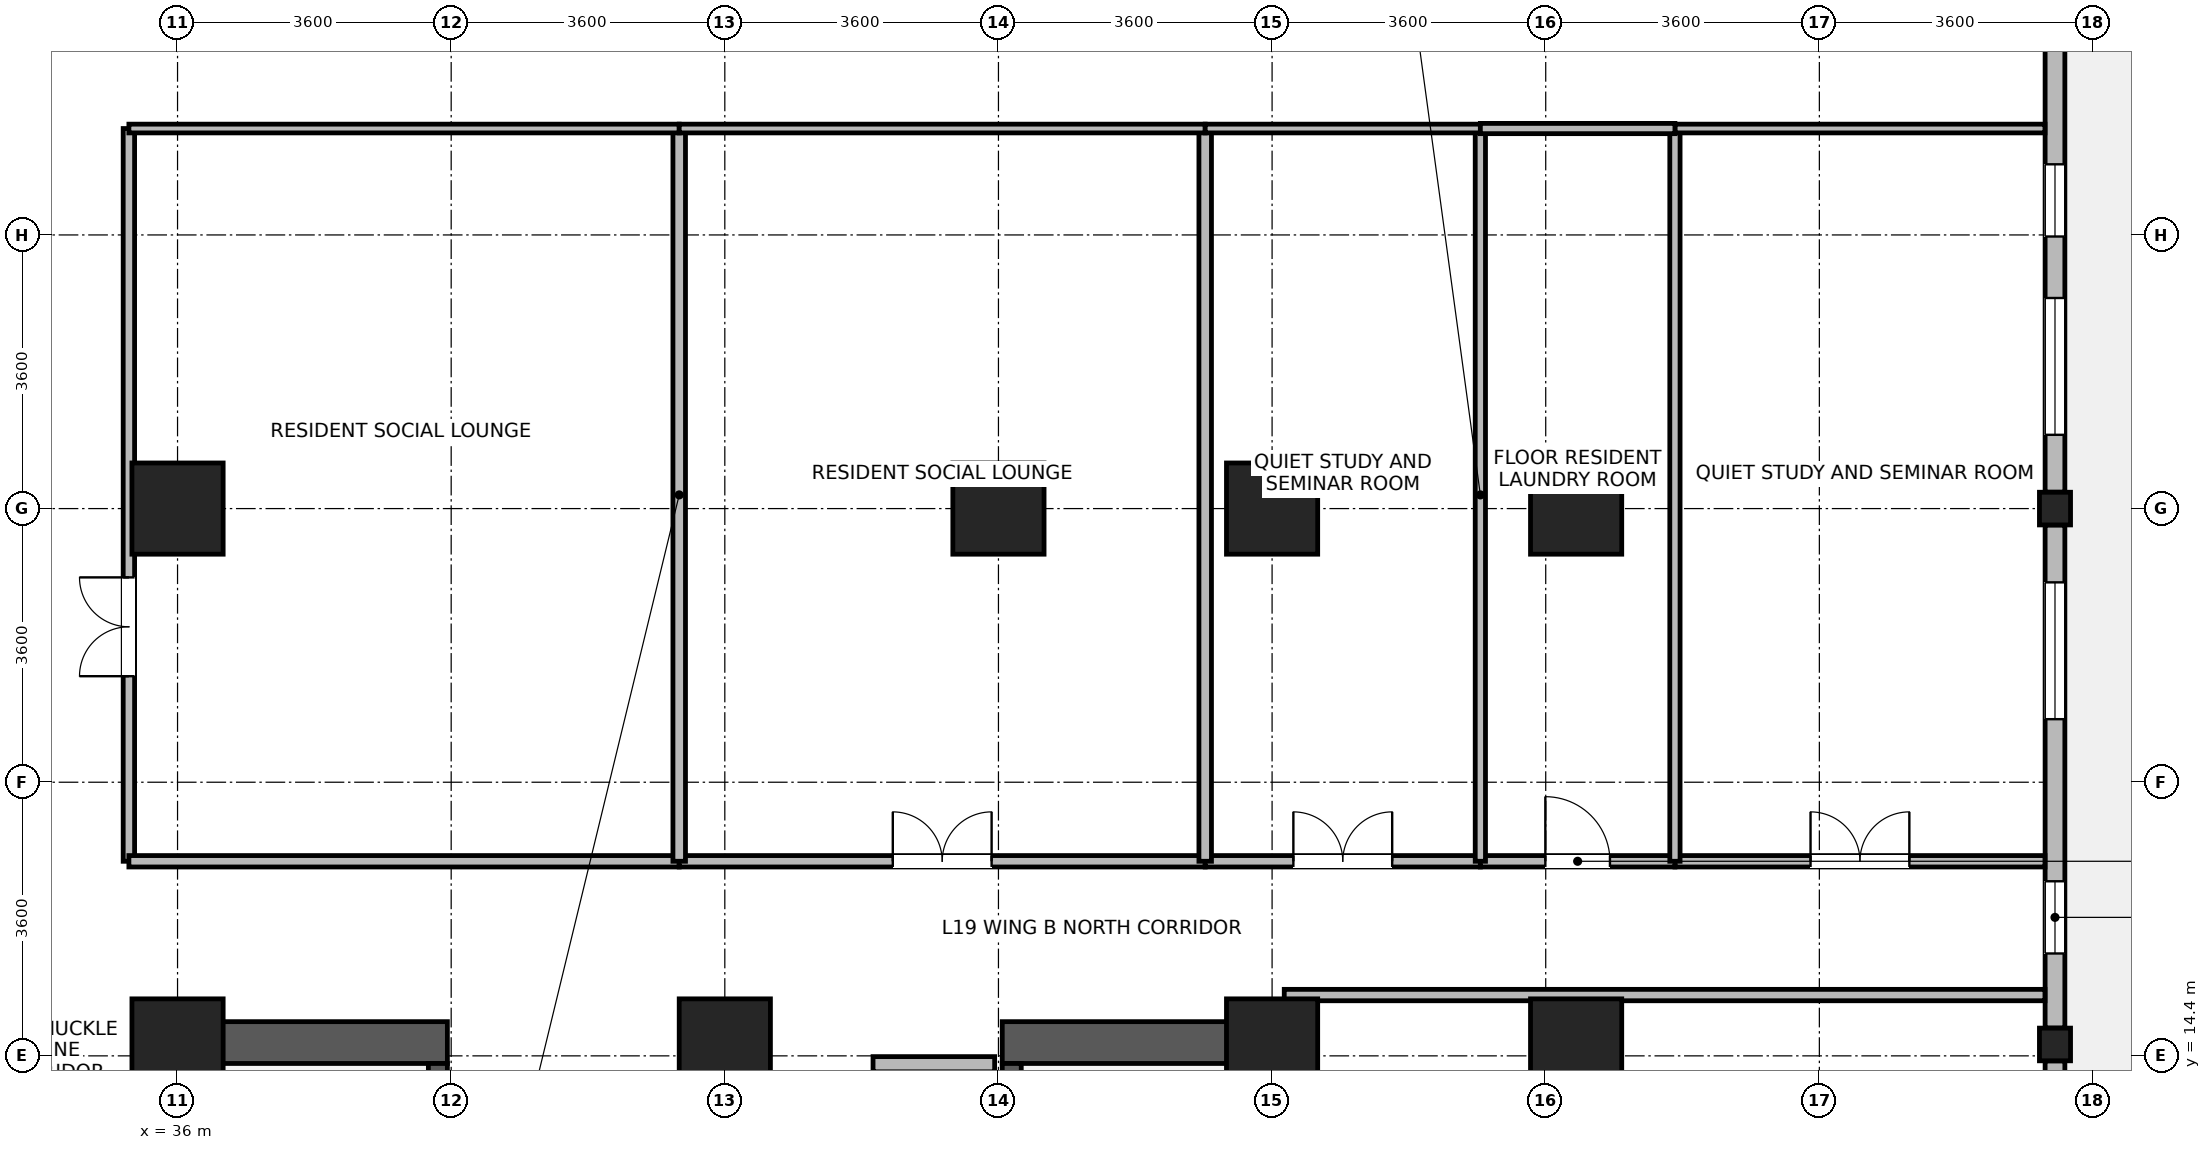
"""IFC4 building model, lengths in metres.
Left out: names, types, materials, properties, quantities, classifications, styles, units other than length and angle.
Written with IfcOpenShell. Run it as: python <this file> out.ifc"""

import sys

from ifc_helpers import new_model, si_unit, direction, frame, frame_2d, origin, origin_2d, place, context, subcontext, project, spatial, rectangle, i_section, extrude, source, transform, mapped, element, fill, save


model = new_model("IFC4")
c1 = context("Model", 3, precision=1e-05, world=origin(), true_north=direction((0.0, 1.0)))
c2 = subcontext(c1, "Body", "Model", "MODEL_VIEW")
j1 = project(units=[si_unit("LENGTHUNIT", "METRE"), si_unit("PLANEANGLEUNIT", "RADIAN")], contexts=[c1])
p1 = place(None, origin())
s1 = spatial("IfcSite", under=j1, at=p1, CompositionType="ELEMENT")
p2 = place(p1, origin())
s2 = spatial("IfcBuilding", under=s1, at=p2, CompositionType="ELEMENT")
p3 = place(p2, frame((0.0, 0.0, 78.6)))
s3 = spatial("IfcBuildingStorey", under=s2, at=p3, CompositionType="ELEMENT", Elevation=78.6)
for number, where, z_axis, x_axis in (
    (1, (36.075, 6.75, 0.0), (0.0, 0.0, 1.0), (0.0, 1.0, 0.0)),
    (2, (50.325, 6.75, 0.0), (0.0, 0.0, 1.0), (0.0, 1.0, 0.0)),
):
    element("IfcWall", number, at=place(p3, frame(where, z_axis=z_axis, x_axis=x_axis)), inside=s3, PredefinedType="SHEAR", context=c2, shape_type="SweptSolid", body=[
        extrude(rectangle(XDim=8.1, YDim=0.55, at=frame_2d((4.05, 0.0))), origin(), (0.0, 0.0, 1.0), 3.45),
    ])
for number, where, z_axis, x_axis in (
    (3, (36.35, 14.575, 0.0), (0.0, 0.0, 1.0), (1.0, 0.0, 0.0)),
    (4, (46.85, 14.575, 0.0), (0.0, 0.0, 1.0), (1.0, 0.0, 0.0)),
):
    element("IfcWall", number, at=place(p3, frame(where, z_axis=z_axis, x_axis=x_axis)), inside=s3, PredefinedType="SHEAR", context=c2, shape_type="SweptSolid", body=[
        extrude(rectangle(XDim=3.2, YDim=0.55, at=frame_2d((1.6, 0.0))), origin(), (0.0, 0.0, 1.0), 3.45),
    ])
p4 = place(p3, frame((39.425, 7.3, 0.0), z_axis=(0.0, 0.0, 1.0), x_axis=(0.0, 1.0, 0.0)))
e5 = element("IfcWall", 5, at=p4, inside=s3, PredefinedType="SHEAR", context=c2, shape_type="SweptSolid", body=[
    extrude(rectangle(XDim=7.0, YDim=0.25, at=frame_2d((3.5, 0.0))), origin(), (0.0, 0.0, 1.0), 3.45),
])
p5 = place(p4, frame((0.15, 0.0, 0.0)))
e6 = element("IfcOpeningElement", 6, at=p5, cuts=e5, PredefinedType="OPENING", context=c2, shape_type="SweptSolid", body=[
    extrude(rectangle(XDim=1.1, YDim=2.08, at=frame_2d((0.55, 1.04))), frame((0.0, 0.135, 0.0), z_axis=(0.0, -1.0, 0.0), x_axis=(1.0, 0.0, 0.0)), (0.0, 0.0, 1.0), 0.27),
])
p6 = place(p3, frame((46.975, 7.3, 0.0), z_axis=(0.0, 0.0, 1.0), x_axis=(0.0, 1.0, 0.0)))
e7 = element("IfcWall", 7, at=p6, inside=s3, PredefinedType="SHEAR", context=c2, shape_type="SweptSolid", body=[
    extrude(rectangle(XDim=7.0, YDim=0.25, at=frame_2d((3.5, 0.0))), origin(), (0.0, 0.0, 1.0), 3.45),
])
p7 = place(p6, frame((0.15, 0.0, 0.0)))
e8 = element("IfcOpeningElement", 8, at=p7, cuts=e7, PredefinedType="OPENING", context=c2, shape_type="SweptSolid", body=[
    extrude(rectangle(XDim=1.1, YDim=2.08, at=frame_2d((0.55, 1.04))), frame((0.0, 0.135, 0.0), z_axis=(0.0, -1.0, 0.0), x_axis=(1.0, 0.0, 0.0)), (0.0, 0.0, 1.0), 0.27),
])
m1 = source(origin(), c2, "Body", "SweptSolid", [
    extrude(rectangle(XDim=1.2, YDim=1.2, at=origin_2d()), origin(), (0.0, 0.0, 1.0), 3.7),
])
for number, where, z_axis, x_axis in (
    (9, (36.0, 21.6, 0.0), (0.0, 0.0, 1.0), (1.0, 0.0, 0.0)),
    (10, (46.8, 21.6, 0.0), (0.0, 0.0, 1.0), (1.0, 0.0, 0.0)),
    (11, (36.0, 14.55, 0.0), (0.0, 0.0, 1.0), (1.0, 0.0, 0.0)),
    (12, (43.2, 14.55, 0.0), (0.0, 0.0, 1.0), (1.0, 0.0, 0.0)),
    (13, (50.4, 14.55, 0.0), (0.0, 0.0, 1.0), (1.0, 0.0, 0.0)),
    (14, (50.4, 21.6, 0.0), (0.0, 0.0, 1.0), (1.0, 0.0, 0.0)),
    (15, (54.4, 14.55, 0.0), (0.0, 0.0, 1.0), (1.0, 0.0, 0.0)),
    (16, (54.4, 21.6, 0.0), (0.0, 0.0, 1.0), (1.0, 0.0, 0.0)),
):
    element("IfcColumn", number, at=place(p3, frame(where, z_axis=z_axis, x_axis=x_axis)), inside=s3, PredefinedType="COLUMN", context=c2, shape_type="MappedRepresentation", body=[
        mapped(m1, transform((0.0, 0.0, 0.0), x_axis=(1.0, 0.0, 0.0), y_axis=(0.0, 1.0, 0.0), z_axis=(0.0, 0.0, 1.0), scale=1.0)),
    ])
m2 = source(origin(), c2, "Body", "SweptSolid", [
    extrude(i_section(OverallWidth=0.409, OverallDepth=0.43, WebThickness=0.024, FlangeThickness=0.033, FilletRadius=0.015, at=origin_2d()), origin(), (0.0, 0.0, 1.0), 3.7),
])
for number, where, z_axis, x_axis in (
    (17, (60.7, 14.55, 0.0), (0.0, 0.0, 1.0), (1.0, 0.0, 0.0)),
    (18, (60.7, 21.6, 0.0), (0.0, 0.0, 1.0), (1.0, 0.0, 0.0)),
):
    element("IfcColumn", number, at=place(p3, frame(where, z_axis=z_axis, x_axis=x_axis)), inside=s3, PredefinedType="COLUMN", context=c2, shape_type="MappedRepresentation", body=[
        mapped(m2, transform((0.0, 0.0, 0.0), x_axis=(1.0, 0.0, 0.0), y_axis=(0.0, 1.0, 0.0), z_axis=(0.0, 0.0, 1.0), scale=1.0)),
    ])
p8 = place(p3, frame((60.7, 14.334, 0.0), z_axis=(0.0, 0.0, 1.0), x_axis=(0.0, -1.0, 0.0)))
e19 = element("IfcWall", 19, at=p8, inside=s3, PredefinedType="STANDARD", context=c2, shape_type="SweptSolid", body=[
    extrude(rectangle(XDim=7.068, YDim=0.26, at=frame_2d((3.534, 0.0))), origin(), (0.0, 0.0, 1.0), 2.93),
])
p9 = place(p8, frame((0.867, 0.0, 0.85)))
e20 = element("IfcOpeningElement", 20, at=p9, cuts=e19, PredefinedType="OPENING", context=c2, shape_type="SweptSolid", body=[
    extrude(rectangle(XDim=1.8, YDim=1.85, at=frame_2d((0.9, 0.925))), frame((0.0, 0.14, 0.0), z_axis=(0.0, -1.0, 0.0), x_axis=(1.0, 0.0, 0.0)), (0.0, 0.0, 1.0), 0.28),
])
p10 = place(p8, frame((4.401, 0.0, 0.85)))
e21 = element("IfcOpeningElement", 21, at=p10, cuts=e19, PredefinedType="OPENING", context=c2, shape_type="SweptSolid", body=[
    extrude(rectangle(XDim=1.8, YDim=1.85, at=frame_2d((0.9, 0.925))), frame((0.0, 0.14, 0.0), z_axis=(0.0, -1.0, 0.0), x_axis=(1.0, 0.0, 0.0)), (0.0, 0.0, 1.0), 0.28),
])
p11 = place(p3, frame((60.7, 21.384, 0.0), z_axis=(0.0, 0.0, 1.0), x_axis=(0.0, -1.0, 0.0)))
e22 = element("IfcWall", 22, at=p11, inside=s3, PredefinedType="STANDARD", context=c2, shape_type="SweptSolid", body=[
    extrude(rectangle(XDim=6.618, YDim=0.26, at=frame_2d((3.309, 0.0))), origin(), (0.0, 0.0, 1.0), 2.93),
])
p12 = place(p11, frame((0.754, 0.0, 0.85)))
e23 = element("IfcOpeningElement", 23, at=p12, cuts=e22, PredefinedType="OPENING", context=c2, shape_type="SweptSolid", body=[
    extrude(rectangle(XDim=1.8, YDim=1.85, at=frame_2d((0.9, 0.925))), frame((0.0, 0.14, 0.0), z_axis=(0.0, -1.0, 0.0), x_axis=(1.0, 0.0, 0.0)), (0.0, 0.0, 1.0), 0.28),
])
p13 = place(p11, frame((4.687, 0.0, 0.85)))
e24 = element("IfcOpeningElement", 24, at=p13, cuts=e22, PredefinedType="OPENING", context=c2, shape_type="SweptSolid", body=[
    extrude(rectangle(XDim=0.95, YDim=1.75, at=frame_2d((0.475, 0.875))), frame((0.0, 0.14, 0.0), z_axis=(0.0, -1.0, 0.0), x_axis=(1.0, 0.0, 0.0)), (0.0, 0.0, 1.0), 0.28),
])
p14 = place(p3, frame((60.7, 28.434, 0.0), z_axis=(0.0, 0.0, 1.0), x_axis=(0.0, -1.0, 0.0)))
e25 = element("IfcWall", 25, at=p14, inside=s3, PredefinedType="STANDARD", context=c2, shape_type="SweptSolid", body=[
    extrude(rectangle(XDim=6.618, YDim=0.26, at=frame_2d((3.309, 0.0))), origin(), (0.0, 0.0, 1.0), 2.93),
])
p15 = place(p14, frame((4.063, 0.0, 0.85)))
e26 = element("IfcOpeningElement", 26, at=p15, cuts=e25, PredefinedType="OPENING", context=c2, shape_type="SweptSolid", body=[
    extrude(rectangle(XDim=1.8, YDim=1.85, at=frame_2d((0.9, 0.925))), frame((0.0, 0.14, 0.0), z_axis=(0.0, -1.0, 0.0), x_axis=(1.0, 0.0, 0.0)), (0.0, 0.0, 1.0), 0.28),
])
p16 = place(p14, frame((2.305, 0.0, 0.85)))
e27 = element("IfcOpeningElement", 27, at=p16, cuts=e25, PredefinedType="OPENING", context=c2, shape_type="SweptSolid", body=[
    extrude(rectangle(XDim=0.95, YDim=1.75, at=frame_2d((0.475, 0.875))), frame((0.0, 0.14, 0.0), z_axis=(0.0, -1.0, 0.0), x_axis=(1.0, 0.0, 0.0)), (0.0, 0.0, 1.0), 0.28),
])
p17 = place(p3, frame((45.15, 14.29, 0.0), z_axis=(0.0, 0.0, 1.0), x_axis=(1.0, 0.0, 0.0)))
e28 = element("IfcWall", 28, at=p17, inside=s3, PredefinedType="PARTITIONING", context=c2, shape_type="SweptSolid", body=[
    extrude(rectangle(XDim=1.6, YDim=0.2, at=frame_2d((0.8, 0.0))), origin(), (0.0, 0.0, 1.0), 2.23),
])
p18 = place(p3, frame((50.56, 15.2, 0.0), z_axis=(0.0, 0.0, 1.0), x_axis=(1.0, 0.0, 0.0)))
e29 = element("IfcWall", 29, at=p18, inside=s3, PredefinedType="PARTITIONING", context=c2, shape_type="SweptSolid", body=[
    extrude(rectangle(XDim=10.008, YDim=0.15, at=frame_2d((5.004, 0.0))), origin(), (0.0, 0.0, 1.0), 3.43),
])
p19 = place(p3, frame((35.36, 16.96, 0.0), z_axis=(0.0, 0.0, 1.0), x_axis=(0.0, 1.0, 0.0)))
e30 = element("IfcWall", 30, at=p19, inside=s3, PredefinedType="PARTITIONING", context=c2, shape_type="SweptSolid", body=[
    extrude(rectangle(XDim=9.64, YDim=0.15, at=frame_2d((4.82, 0.0))), origin(), (0.0, 0.0, 1.0), 3.43),
])
p20 = place(p19, frame((2.435, 0.0, 0.0)))
e31 = element("IfcOpeningElement", 31, at=p20, cuts=e30, PredefinedType="OPENING", context=c2, shape_type="SweptSolid", body=[
    extrude(rectangle(XDim=1.3, YDim=2.12, at=frame_2d((0.65, 1.06))), frame((0.0, 0.085, 0.0), z_axis=(0.0, -1.0, 0.0), x_axis=(1.0, 0.0, 0.0)), (0.0, 0.0, 1.0), 0.17),
])
p21 = place(p3, frame((35.36, 16.96, 0.0), z_axis=(0.0, 0.0, 1.0), x_axis=(1.0, 0.0, 0.0)))
e32 = element("IfcWall", 32, at=p21, inside=s3, PredefinedType="PARTITIONING", context=c2, shape_type="SweptSolid", body=[
    extrude(rectangle(XDim=7.24, YDim=0.15, at=frame_2d((3.62, 0.0))), origin(), (0.0, 0.0, 1.0), 3.43),
])
p22 = place(p3, frame((42.6, 16.96, 0.0), z_axis=(0.0, 0.0, 1.0), x_axis=(1.0, 0.0, 0.0)))
e33 = element("IfcWall", 33, at=p22, inside=s3, PredefinedType="PARTITIONING", context=c2, shape_type="SweptSolid", body=[
    extrude(rectangle(XDim=6.92, YDim=0.15, at=frame_2d((3.46, 0.0))), origin(), (0.0, 0.0, 1.0), 3.43),
])
p23 = place(p22, frame((2.81, 0.0, 0.0)))
e34 = element("IfcOpeningElement", 34, at=p23, cuts=e33, PredefinedType="OPENING", context=c2, shape_type="SweptSolid", body=[
    extrude(rectangle(XDim=1.3, YDim=2.12, at=frame_2d((0.65, 1.06))), frame((0.0, 0.085, 0.0), z_axis=(0.0, -1.0, 0.0), x_axis=(1.0, 0.0, 0.0)), (0.0, 0.0, 1.0), 0.17),
])
p24 = place(p3, frame((55.7, 16.96, 0.0), z_axis=(0.0, 0.0, 1.0), x_axis=(1.0, 0.0, 0.0)))
e35 = element("IfcWall", 35, at=p24, inside=s3, PredefinedType="PARTITIONING", context=c2, shape_type="SweptSolid", body=[
    extrude(rectangle(XDim=4.868, YDim=0.15, at=frame_2d((2.434, 0.0))), origin(), (0.0, 0.0, 1.0), 3.43),
])
p25 = place(p24, frame((1.784, 0.0, 0.0)))
e36 = element("IfcOpeningElement", 36, at=p25, cuts=e35, PredefinedType="OPENING", context=c2, shape_type="SweptSolid", body=[
    extrude(rectangle(XDim=1.3, YDim=2.12, at=frame_2d((0.65, 1.06))), frame((0.0, 0.085, 0.0), z_axis=(0.0, -1.0, 0.0), x_axis=(1.0, 0.0, 0.0)), (0.0, 0.0, 1.0), 0.17),
])
p26 = place(p3, frame((49.52, 16.96, 0.0), z_axis=(0.0, 0.0, 1.0), x_axis=(1.0, 0.0, 0.0)))
e37 = element("IfcWall", 37, at=p26, inside=s3, PredefinedType="PARTITIONING", context=c2, shape_type="SweptSolid", body=[
    extrude(rectangle(XDim=3.62, YDim=0.15, at=frame_2d((1.81, 0.0))), origin(), (0.0, 0.0, 1.0), 3.43),
])
p27 = place(p26, frame((1.16, 0.0, 0.0)))
e38 = element("IfcOpeningElement", 38, at=p27, cuts=e37, PredefinedType="OPENING", context=c2, shape_type="SweptSolid", body=[
    extrude(rectangle(XDim=1.3, YDim=2.12, at=frame_2d((0.65, 1.06))), frame((0.0, 0.085, 0.0), z_axis=(0.0, -1.0, 0.0), x_axis=(1.0, 0.0, 0.0)), (0.0, 0.0, 1.0), 0.17),
])
p28 = place(p3, frame((53.14, 16.96, 0.0), z_axis=(0.0, 0.0, 1.0), x_axis=(1.0, 0.0, 0.0)))
e39 = element("IfcWall", 39, at=p28, inside=s3, PredefinedType="PARTITIONING", context=c2, shape_type="SweptSolid", body=[
    extrude(rectangle(XDim=2.56, YDim=0.15, at=frame_2d((1.28, 0.0))), origin(), (0.0, 0.0, 1.0), 3.43),
])
p29 = place(p28, frame((0.855, 0.0, 0.0)))
e40 = element("IfcOpeningElement", 40, at=p29, cuts=e39, PredefinedType="OPENING", context=c2, shape_type="SweptSolid", body=[
    extrude(rectangle(XDim=0.85, YDim=2.04, at=frame_2d((0.425, 1.02))), frame((0.0, 0.085, 0.0), z_axis=(0.0, -1.0, 0.0), x_axis=(1.0, 0.0, 0.0)), (0.0, 0.0, 1.0), 0.17),
])
for number, where, z_axis, x_axis in (
    (41, (42.6, 16.96, 0.0), (0.0, 0.0, 1.0), (0.0, 1.0, 0.0)),
    (42, (49.52, 16.96, 0.0), (0.0, 0.0, 1.0), (0.0, 1.0, 0.0)),
):
    element("IfcWall", number, at=place(p3, frame(where, z_axis=z_axis, x_axis=x_axis)), inside=s3, PredefinedType="PARTITIONING", context=c2, shape_type="SweptSolid", body=[
        extrude(rectangle(XDim=9.64, YDim=0.165, at=frame_2d((4.82, 0.0))), origin(), (0.0, 0.0, 1.0), 3.43),
    ])
for number, where, z_axis, x_axis in (
    (43, (53.14, 16.96, 0.0), (0.0, 0.0, 1.0), (0.0, 1.0, 0.0)),
    (44, (55.7, 16.96, 0.0), (0.0, 0.0, 1.0), (0.0, 1.0, 0.0)),
):
    element("IfcWall", number, at=place(p3, frame(where, z_axis=z_axis, x_axis=x_axis)), inside=s3, PredefinedType="PARTITIONING", context=c2, shape_type="SweptSolid", body=[
        extrude(rectangle(XDim=9.64, YDim=0.135, at=frame_2d((4.82, 0.0))), origin(), (0.0, 0.0, 1.0), 3.43),
    ])
p30 = place(p3, frame((35.36, 26.6, 0.0), z_axis=(0.0, 0.0, 1.0), x_axis=(1.0, 0.0, 0.0)))
e45 = element("IfcWall", 45, at=p30, inside=s3, PredefinedType="PARTITIONING", context=c2, shape_type="SweptSolid", body=[
    extrude(rectangle(XDim=7.24, YDim=0.115, at=frame_2d((3.62, 0.0))), origin(), (0.0, 0.0, 1.0), 3.43),
])
p31 = place(p3, frame((42.6, 26.6, 0.0), z_axis=(0.0, 0.0, 1.0), x_axis=(1.0, 0.0, 0.0)))
e46 = element("IfcWall", 46, at=p31, inside=s3, PredefinedType="PARTITIONING", context=c2, shape_type="SweptSolid", body=[
    extrude(rectangle(XDim=6.92, YDim=0.115, at=frame_2d((3.46, 0.0))), origin(), (0.0, 0.0, 1.0), 3.43),
])
p32 = place(p3, frame((55.7, 26.6, 0.0), z_axis=(0.0, 0.0, 1.0), x_axis=(1.0, 0.0, 0.0)))
e47 = element("IfcWall", 47, at=p32, inside=s3, PredefinedType="PARTITIONING", context=c2, shape_type="SweptSolid", body=[
    extrude(rectangle(XDim=4.868, YDim=0.115, at=frame_2d((2.434, 0.0))), origin(), (0.0, 0.0, 1.0), 3.43),
])
p33 = place(p3, frame((49.52, 26.6, 0.0), z_axis=(0.0, 0.0, 1.0), x_axis=(1.0, 0.0, 0.0)))
e48 = element("IfcWall", 48, at=p33, inside=s3, PredefinedType="PARTITIONING", context=c2, shape_type="SweptSolid", body=[
    extrude(rectangle(XDim=3.62, YDim=0.115, at=frame_2d((1.81, 0.0))), origin(), (0.0, 0.0, 1.0), 3.43),
])
p34 = place(p3, frame((53.14, 26.6, 0.0), z_axis=(0.0, 0.0, 1.0), x_axis=(1.0, 0.0, 0.0)))
e49 = element("IfcWall", 49, at=p34, inside=s3, PredefinedType="PARTITIONING", context=c2, shape_type="SweptSolid", body=[
    extrude(rectangle(XDim=2.56, YDim=0.135, at=frame_2d((1.28, 0.0))), origin(), (0.0, 0.0, 1.0), 3.43),
])
p35 = place(p12, origin())
e50 = element("IfcWindow", 50, at=p35, inside=s3, PartitioningType="SINGLE_PANEL", PredefinedType="WINDOW", context=c2, shape_type="SweptSolid", body=[
    extrude(rectangle(XDim=1.8, YDim=1.85, at=frame_2d((0.9, 0.925))), frame((0.0, 0.03, 0.0), z_axis=(0.0, -1.0, 0.0), x_axis=(1.0, 0.0, 0.0)), (0.0, 0.0, 1.0), 0.06),
])
fill(e23, e50)
p36 = place(p13, origin())
e51 = element("IfcWindow", 51, at=p36, inside=s3, PartitioningType="SINGLE_PANEL", PredefinedType="WINDOW", context=c2, shape_type="SweptSolid", body=[
    extrude(rectangle(XDim=0.95, YDim=1.75, at=frame_2d((0.475, 0.875))), frame((0.0, 0.03, 0.0), z_axis=(0.0, -1.0, 0.0), x_axis=(1.0, 0.0, 0.0)), (0.0, 0.0, 1.0), 0.06),
])
fill(e24, e51)
p37 = place(p15, origin())
e52 = element("IfcWindow", 52, at=p37, inside=s3, PartitioningType="SINGLE_PANEL", PredefinedType="WINDOW", context=c2, shape_type="SweptSolid", body=[
    extrude(rectangle(XDim=1.8, YDim=1.85, at=frame_2d((0.9, 0.925))), frame((0.0, 0.03, 0.0), z_axis=(0.0, -1.0, 0.0), x_axis=(1.0, 0.0, 0.0)), (0.0, 0.0, 1.0), 0.06),
])
fill(e26, e52)
p38 = place(p16, origin())
e53 = element("IfcWindow", 53, at=p38, inside=s3, PartitioningType="SINGLE_PANEL", PredefinedType="WINDOW", context=c2, shape_type="SweptSolid", body=[
    extrude(rectangle(XDim=0.95, YDim=1.75, at=frame_2d((0.475, 0.875))), frame((0.0, 0.03, 0.0), z_axis=(0.0, -1.0, 0.0), x_axis=(1.0, 0.0, 0.0)), (0.0, 0.0, 1.0), 0.06),
])
fill(e27, e53)
p39 = place(p20, origin())
e54 = element("IfcDoor", 54, at=p39, inside=s3, OperationType="DOUBLE_DOOR_SINGLE_SWING", PredefinedType="DOOR", context=c2, shape_type="SweptSolid", body=[
    extrude(rectangle(XDim=1.3, YDim=2.12, at=frame_2d((0.65, 1.06))), frame((0.0, 0.025, 0.0), z_axis=(0.0, -1.0, 0.0), x_axis=(1.0, 0.0, 0.0)), (0.0, 0.0, 1.0), 0.05),
])
fill(e31, e54)
p40 = place(p23, origin())
e55 = element("IfcDoor", 55, at=p40, inside=s3, OperationType="DOUBLE_DOOR_SINGLE_SWING", PredefinedType="DOOR", context=c2, shape_type="SweptSolid", body=[
    extrude(rectangle(XDim=1.3, YDim=2.12, at=frame_2d((0.65, 1.06))), frame((0.0, 0.025, 0.0), z_axis=(0.0, -1.0, 0.0), x_axis=(1.0, 0.0, 0.0)), (0.0, 0.0, 1.0), 0.05),
])
fill(e34, e55)
p41 = place(p25, origin())
e56 = element("IfcDoor", 56, at=p41, inside=s3, OperationType="DOUBLE_DOOR_SINGLE_SWING", PredefinedType="DOOR", context=c2, shape_type="SweptSolid", body=[
    extrude(rectangle(XDim=1.3, YDim=2.12, at=frame_2d((0.65, 1.06))), frame((0.0, 0.025, 0.0), z_axis=(0.0, -1.0, 0.0), x_axis=(1.0, 0.0, 0.0)), (0.0, 0.0, 1.0), 0.05),
])
fill(e36, e56)
p42 = place(p27, origin())
e57 = element("IfcDoor", 57, at=p42, inside=s3, OperationType="DOUBLE_DOOR_SINGLE_SWING", PredefinedType="DOOR", context=c2, shape_type="SweptSolid", body=[
    extrude(rectangle(XDim=1.3, YDim=2.12, at=frame_2d((0.65, 1.06))), frame((0.0, 0.025, 0.0), z_axis=(0.0, -1.0, 0.0), x_axis=(1.0, 0.0, 0.0)), (0.0, 0.0, 1.0), 0.05),
])
fill(e38, e57)
p43 = place(p29, origin())
e58 = element("IfcDoor", 58, at=p43, inside=s3, OperationType="SINGLE_SWING_LEFT", PredefinedType="DOOR", context=c2, shape_type="SweptSolid", body=[
    extrude(rectangle(XDim=0.85, YDim=2.04, at=frame_2d((0.425, 1.02))), frame((0.0, 0.025, 0.0), z_axis=(0.0, -1.0, 0.0), x_axis=(1.0, 0.0, 0.0)), (0.0, 0.0, 1.0), 0.05),
])
fill(e40, e58)
save(model, sys.argv[1])
